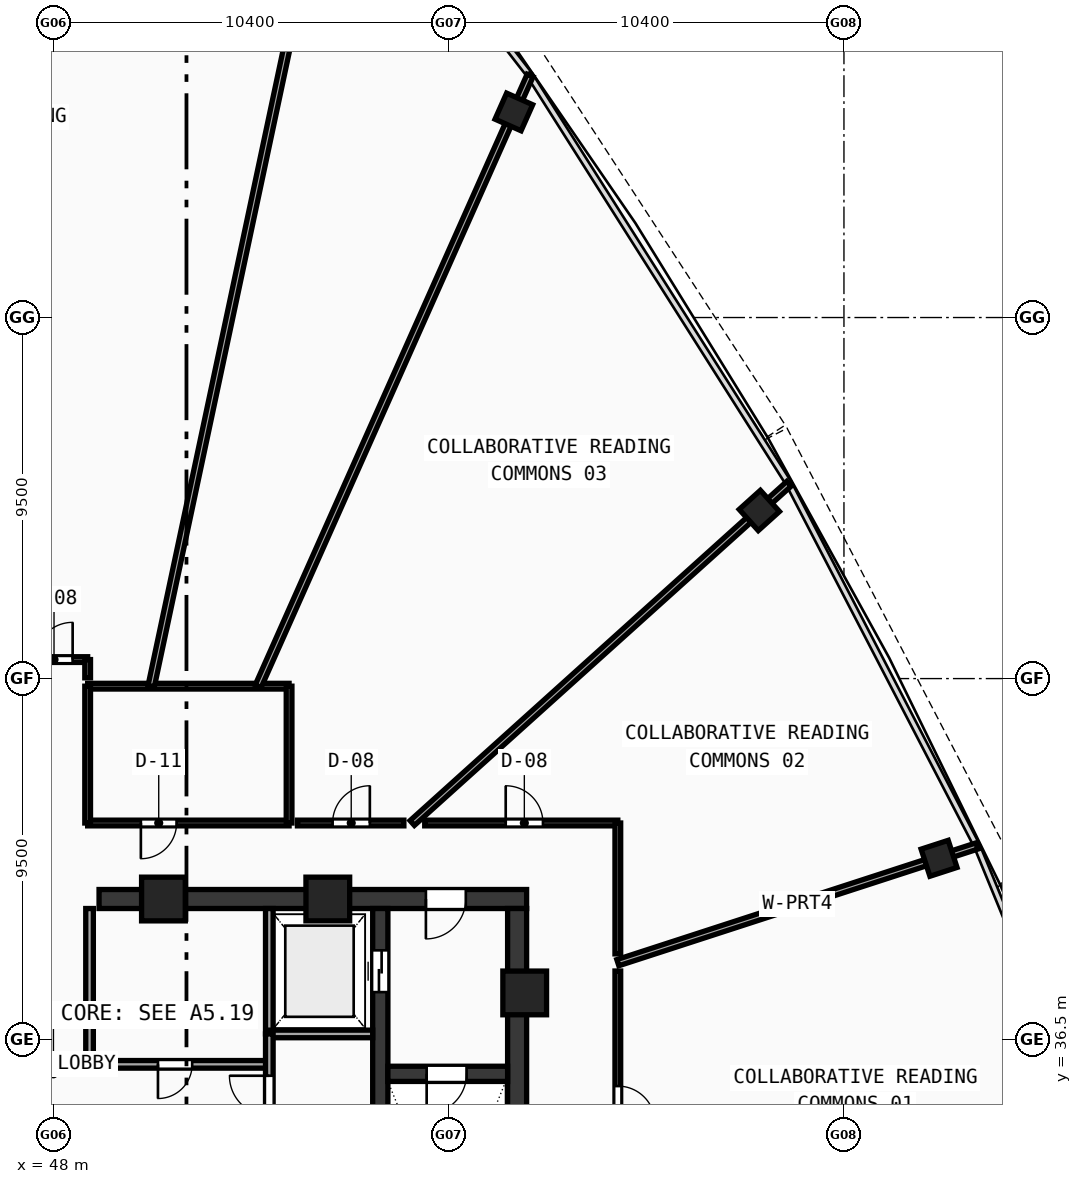
"""IFC4 building model, lengths in metres.
Left out: names, types, materials, properties, quantities, classifications, styles, units other than length and angle.
Written with IfcOpenShell. Run it as: python <this file> out.ifc"""

import sys

from ifc_helpers import new_model, si_unit, direction, frame, frame_2d, origin, origin_with_axes, origin_2d, place, context, subcontext, project, spatial, rectangle, hollow_rectangle, extrude, source, transform, mapped, element, fill, save


model = new_model("IFC4")
c1 = context("Model", 3, precision=1e-05, world=origin(), true_north=direction((0.0, 1.0)))
c2 = subcontext(c1, "Body", "Model", "MODEL_VIEW")
j1 = project(units=[si_unit("LENGTHUNIT", "METRE"), si_unit("PLANEANGLEUNIT", "RADIAN")], contexts=[c1])
p1 = place(None, origin())
s1 = spatial("IfcSite", under=j1, at=p1, CompositionType="ELEMENT")
p2 = place(p1, origin())
s2 = spatial("IfcBuilding", under=s1, at=p2, CompositionType="ELEMENT")
p3 = place(p2, frame((0.0, 0.0, 314.86)))
s3 = spatial("IfcBuildingStorey", under=s2, at=p3, CompositionType="ELEMENT", Elevation=314.86)
p4 = place(p3, frame((49.2, 40.2, 0.0), z_axis=(0.0, 0.0, 1.0), x_axis=(1.0, 0.0, 0.0)))
e1 = element("IfcWall", 1, at=p4, inside=s3, PredefinedType="SHEAR", context=c2, shape_type="SweptSolid", body=[
    extrude(rectangle(XDim=11.25, YDim=0.5, at=frame_2d((5.625, 0.0))), origin(), (0.0, 0.0, 1.0), 5.57),
])
p5 = place(p4, frame((8.6, 0.0, 0.0)))
e2 = element("IfcOpeningElement", 2, at=p5, cuts=e1, PredefinedType="OPENING", context=c2, shape_type="SweptSolid", body=[
    extrude(rectangle(XDim=1.05, YDim=2.1, at=frame_2d((0.525, 1.05))), frame((0.0, 0.26, 0.0), z_axis=(0.0, -1.0, 0.0), x_axis=(1.0, 0.0, 0.0)), (0.0, 0.0, 1.0), 0.52),
])
p6 = place(p3, frame((60.2, 27.75, 0.0), z_axis=(0.0, 0.0, 1.0), x_axis=(0.0, 1.0, 0.0)))
e3 = element("IfcWall", 3, at=p6, inside=s3, PredefinedType="SHEAR", context=c2, shape_type="SweptSolid", body=[
    extrude(rectangle(XDim=12.2, YDim=0.5, at=frame_2d((6.1, 0.0))), origin(), (0.0, 0.0, 1.0), 5.57),
])
p7 = place(p3, frame((56.6, 27.75, 0.0), z_axis=(0.0, 0.0, 1.0), x_axis=(0.0, 1.0, 0.0)))
e4 = element("IfcWall", 4, at=p7, inside=s3, PredefinedType="SHEAR", context=c2, shape_type="SweptSolid", body=[
    extrude(rectangle(XDim=12.2, YDim=0.4, at=frame_2d((6.1, 0.0))), origin(), (0.0, 0.0, 1.0), 5.57),
])
p8 = place(p7, frame((10.0, 0.0, 0.0)))
e5 = element("IfcOpeningElement", 5, at=p8, cuts=e4, PredefinedType="OPENING", context=c2, shape_type="SweptSolid", body=[
    extrude(rectangle(XDim=1.1, YDim=2.1, at=frame_2d((0.55, 1.05))), frame((0.0, 0.21, 0.0), z_axis=(0.0, -1.0, 0.0), x_axis=(1.0, 0.0, 0.0)), (0.0, 0.0, 1.0), 0.42),
])
p9 = place(p3, frame((56.8, 35.6, 0.0), z_axis=(0.0, 0.0, 1.0), x_axis=(1.0, 0.0, 0.0)))
e6 = element("IfcWall", 6, at=p9, inside=s3, PredefinedType="SHEAR", context=c2, shape_type="SweptSolid", body=[
    extrude(rectangle(XDim=3.15, YDim=0.4, at=frame_2d((1.575, 0.0))), origin(), (0.0, 0.0, 1.0), 5.57),
])
p10 = place(p9, frame((1.02, 0.0, 0.0)))
e7 = element("IfcOpeningElement", 7, at=p10, cuts=e6, PredefinedType="OPENING", context=c2, shape_type="SweptSolid", body=[
    extrude(rectangle(XDim=1.05, YDim=2.1, at=frame_2d((0.525, 1.05))), frame((0.0, 0.21, 0.0), z_axis=(0.0, -1.0, 0.0), x_axis=(1.0, 0.0, 0.0)), (0.0, 0.0, 1.0), 0.42),
])
m1 = source(origin(), c2, "Body", "SweptSolid", [
    extrude(hollow_rectangle(XDim=1.15, YDim=1.15, WallThickness=0.048, at=origin_2d()), origin(), (0.0, 0.0, 1.0), 5.83),
])
for number, where, z_axis, x_axis in (
    (8, (60.4, 37.729, -0.26), (0.0, 0.0, 1.0), (1.0, 0.0, 0.0)),
    (9, (55.219, 40.2, -0.26), (0.0, 0.0, 1.0), (1.0, 0.0, 0.0)),
    (10, (50.894, 40.2, -0.26), (0.0, 0.0, 1.0), (1.0, 0.0, 0.0)),
):
    element("IfcColumn", number, at=place(p3, frame(where, z_axis=z_axis, x_axis=x_axis)), inside=s3, PredefinedType="COLUMN", context=c2, shape_type="MappedRepresentation", body=[
        mapped(m1, transform((0.0, 0.0, 0.0), scale=1.0)),
    ])
m2 = source(origin(), c2, "Body", "SweptSolid", [
    extrude(hollow_rectangle(XDim=0.75, YDim=0.75, WallThickness=0.028, at=origin_2d()), origin(), (0.0, 0.0, 1.0), 5.83),
])
for number, where, z_axis, x_axis in (
    (11, (71.302, 41.271, -0.26), (0.0, 0.0, 1.0), (-0.309, 0.951, 0.0)),
    (12, (66.573, 50.424, -0.26), (0.0, 0.0, 1.0), (-0.669, 0.743, 0.0)),
    (13, (60.114, 60.909, -0.26), (0.0, 0.0, 1.0), (-0.914, 0.407, 0.0)),
):
    element("IfcColumn", number, at=place(p3, frame(where, z_axis=z_axis, x_axis=x_axis)), inside=s3, PredefinedType="COLUMN", context=c2, shape_type="MappedRepresentation", body=[
        mapped(m2, transform((0.0, 0.0, 0.0), scale=1.0)),
    ])
p11 = place(p3, frame((53.68, 36.65, 0.0), z_axis=(0.0, 0.0, 1.0), x_axis=(0.0, 1.0, 0.0)))
e14 = element("IfcWall", 14, at=p11, inside=s3, PredefinedType="SOLIDWALL", context=c2, shape_type="SweptSolid", body=[
    extrude(rectangle(XDim=3.3, YDim=0.2, at=frame_2d((1.65, 0.0))), origin(), (0.0, 0.0, 1.0), 5.57),
])
p12 = place(p3, frame((53.68, 36.65, 0.0), z_axis=(0.0, 0.0, 1.0), x_axis=(1.0, 0.0, 0.0)))
e15 = element("IfcWall", 15, at=p12, inside=s3, PredefinedType="SOLIDWALL", context=c2, shape_type="SweptSolid", body=[
    extrude(rectangle(XDim=2.72, YDim=0.2, at=frame_2d((1.36, 0.0))), origin(), (0.0, 0.0, 1.0), 5.57),
])
p13 = place(p3, frame((48.95, 35.85, 0.0), z_axis=(0.0, 0.0, 1.0), x_axis=(1.0, 0.0, 0.0)))
e16 = element("IfcWall", 16, at=p13, inside=s3, PredefinedType="SOLIDWALL", context=c2, shape_type="SweptSolid", body=[
    extrude(rectangle(XDim=4.73, YDim=0.2, at=frame_2d((2.365, 0.0))), origin(), (0.0, 0.0, 1.0), 5.57),
])
p14 = place(p13, frame((1.8, 0.0, 0.0)))
e17 = element("IfcOpeningElement", 17, at=p14, cuts=e16, PredefinedType="OPENING", context=c2, shape_type="SweptSolid", body=[
    extrude(rectangle(XDim=0.9, YDim=2.1, at=frame_2d((0.45, 1.05))), frame((0.0, 0.11, 0.0), z_axis=(0.0, -1.0, 0.0), x_axis=(1.0, 0.0, 0.0)), (0.0, 0.0, 1.0), 0.22),
])
p15 = place(p3, frame((48.95, 35.85, 0.0), z_axis=(0.0, 0.0, 1.0), x_axis=(0.0, 1.0, 0.0)))
e18 = element("IfcWall", 18, at=p15, inside=s3, PredefinedType="SOLIDWALL", context=c2, shape_type="SweptSolid", body=[
    extrude(rectangle(XDim=4.1, YDim=0.2, at=frame_2d((2.05, 0.0))), origin(), (0.0, 0.0, 1.0), 5.57),
])
p16 = place(p3, frame((53.68, 27.6, 0.0), z_axis=(0.0, 0.0, 1.0), x_axis=(0.0, 1.0, 0.0)))
e19 = element("IfcWall", 19, at=p16, inside=s3, PredefinedType="SOLIDWALL", context=c2, shape_type="SweptSolid", body=[
    extrude(rectangle(XDim=9.05, YDim=0.2, at=frame_2d((4.525, 0.0))), origin(), (0.0, 0.0, 1.0), 2.22),
])
p17 = place(p16, frame((6.9, 0.0, 0.0)))
e20 = element("IfcOpeningElement", 20, at=p17, cuts=e19, PredefinedType="OPENING", context=c2, shape_type="SweptSolid", body=[
    extrude(rectangle(XDim=1.05, YDim=2.1, at=frame_2d((0.525, 1.05))), frame((0.0, 0.11, 0.0), z_axis=(0.0, -1.0, 0.0), x_axis=(1.0, 0.0, 0.0)), (0.0, 0.0, 1.0), 0.22),
])
p18 = place(p3, frame((48.9, 42.2, 0.0), z_axis=(0.0, 0.0, 1.0), x_axis=(1.0, 0.0, 0.0)))
e21 = element("IfcWall", 21, at=p18, inside=s3, PredefinedType="PARTITIONING", context=c2, shape_type="SweptSolid", body=[
    extrude(rectangle(XDim=5.3, YDim=0.15, at=frame_2d((2.65, 0.0))), origin(), (0.0, 0.0, 1.0), 2.22),
])
p19 = place(p18, frame((1.4, 0.0, 0.0)))
e22 = element("IfcOpeningElement", 22, at=p19, cuts=e21, PredefinedType="OPENING", context=c2, shape_type="SweptSolid", body=[
    extrude(rectangle(XDim=0.94, YDim=2.1, at=frame_2d((0.47, 1.05))), frame((0.0, 0.085, 0.0), z_axis=(0.0, -1.0, 0.0), x_axis=(1.0, 0.0, 0.0)), (0.0, 0.0, 1.0), 0.17),
])
p20 = place(p3, frame((48.9, 45.8, 0.0), z_axis=(0.0, 0.0, 1.0), x_axis=(1.0, 0.0, 0.0)))
e23 = element("IfcWall", 23, at=p20, inside=s3, PredefinedType="PARTITIONING", context=c2, shape_type="SweptSolid", body=[
    extrude(rectangle(XDim=5.3, YDim=0.15, at=frame_2d((2.65, 0.0))), origin(), (0.0, 0.0, 1.0), 2.22),
])
p21 = place(p3, frame((48.9, 42.2, 0.0), z_axis=(0.0, 0.0, 1.0), x_axis=(0.0, 1.0, 0.0)))
e24 = element("IfcWall", 24, at=p21, inside=s3, PredefinedType="PARTITIONING", context=c2, shape_type="SweptSolid", body=[
    extrude(rectangle(XDim=3.6, YDim=0.15, at=frame_2d((1.8, 0.0))), origin(), (0.0, 0.0, 1.0), 5.57),
])
p22 = place(p3, frame((54.2, 42.2, 0.0), z_axis=(0.0, 0.0, 1.0), x_axis=(0.0, 1.0, 0.0)))
e25 = element("IfcWall", 25, at=p22, inside=s3, PredefinedType="PARTITIONING", context=c2, shape_type="SweptSolid", body=[
    extrude(rectangle(XDim=3.6, YDim=0.15, at=frame_2d((1.8, 0.0))), origin(), (0.0, 0.0, 1.0), 5.22),
])
p23 = place(p3, frame((62.85, 38.525, 0.0), z_axis=(0.0, 0.0, 1.0), x_axis=(0.951056273407, 0.309017741906, 0.0)))
e26 = element("IfcWall", 26, at=p23, inside=s3, PredefinedType="PARTITIONING", context=c2, shape_type="SweptSolid", body=[
    extrude(rectangle(XDim=9.937, YDim=0.17, at=frame_2d((4.969, 0.0))), origin(), (0.0, 0.0, 1.0), 2.22),
])
p24 = place(p3, frame((57.44, 42.2, 0.0), z_axis=(0.0, 0.0, 1.0), x_axis=(0.743143971996, 0.669131554245, 0.0)))
e27 = element("IfcWall", 27, at=p24, inside=s3, PredefinedType="PARTITIONING", context=c2, shape_type="SweptSolid", body=[
    extrude(rectangle(XDim=13.34, YDim=0.17, at=frame_2d((6.67, 0.0))), origin(), (0.0, 0.0, 1.0), 2.22),
])
p25 = place(p3, frame((53.387, 45.8, 0.0), z_axis=(0.0, 0.0, 1.0), x_axis=(0.406746244391, 0.913541182801, 0.0)))
e28 = element("IfcWall", 28, at=p25, inside=s3, PredefinedType="PARTITIONING", context=c2, shape_type="SweptSolid", body=[
    extrude(rectangle(XDim=17.589, YDim=0.17, at=frame_2d((8.794, 0.0))), origin(), (0.0, 0.0, 1.0), 2.22),
])
p26 = place(p3, frame((50.572, 45.8, 0.0), z_axis=(0.0, 0.0, 1.0), x_axis=(0.207911865665, 0.978147563569, 0.0)))
e29 = element("IfcWall", 29, at=p26, inside=s3, PredefinedType="PARTITIONING", context=c2, shape_type="SweptSolid", body=[
    extrude(rectangle(XDim=23.201, YDim=0.17, at=frame_2d((11.601, 0.0))), origin(), (0.0, 0.0, 1.0), 4.97),
])
p27 = place(p3, frame((47.1, 46.5, 0.0), z_axis=(0.0, 0.0, 1.0), x_axis=(1.0, 0.0, 0.0)))
e30 = element("IfcWall", 30, at=p27, inside=s3, PredefinedType="PARTITIONING", context=c2, shape_type="SweptSolid", body=[
    extrude(rectangle(XDim=1.8, YDim=0.15, at=frame_2d((0.9, 0.0))), origin(), (0.0, 0.0, 1.0), 5.22),
])
p28 = place(p27, frame((0.425, 0.0, 0.0)))
e31 = element("IfcOpeningElement", 31, at=p28, cuts=e30, PredefinedType="OPENING", context=c2, shape_type="SweptSolid", body=[
    extrude(rectangle(XDim=0.98, YDim=2.12, at=frame_2d((0.49, 1.06))), frame((0.0, 0.085, 0.0), z_axis=(0.0, -1.0, 0.0), x_axis=(1.0, 0.0, 0.0)), (0.0, 0.0, 1.0), 0.17),
])
p29 = place(p3, frame((48.9, 46.5, 0.0), z_axis=(0.0, 0.0, 1.0), x_axis=(0.0, -1.0, 0.0)))
e32 = element("IfcWall", 32, at=p29, inside=s3, PredefinedType="PARTITIONING", context=c2, shape_type="SweptSolid", body=[
    extrude(rectangle(XDim=0.48, YDim=0.15, at=frame_2d((0.24, 0.0))), origin(), (0.0, 0.0, 1.0), 5.22),
])
p30 = place(p3, frame((54.42, 42.2, 0.0), z_axis=(0.0, 0.0, 1.0), x_axis=(1.0, 0.0, 0.0)))
e33 = element("IfcWall", 33, at=p30, inside=s3, PredefinedType="PARTITIONING", context=c2, shape_type="SweptSolid", body=[
    extrude(rectangle(XDim=2.801, YDim=0.15, at=frame_2d((1.4, 0.0))), origin(), (0.0, 0.0, 1.0), 2.22),
])
p31 = place(p30, frame((0.925, 0.0, 0.0)))
e34 = element("IfcOpeningElement", 34, at=p31, cuts=e33, PredefinedType="OPENING", context=c2, shape_type="SweptSolid", body=[
    extrude(rectangle(XDim=0.98, YDim=2.12, at=frame_2d((0.49, 1.06))), frame((0.0, 0.085, 0.0), z_axis=(0.0, -1.0, 0.0), x_axis=(1.0, 0.0, 0.0)), (0.0, 0.0, 1.0), 0.17),
])
p32 = place(p3, frame((57.769, 42.2, 0.0), z_axis=(0.0, 0.0, 1.0), x_axis=(1.0, 0.0, 0.0)))
e35 = element("IfcWall", 35, at=p32, inside=s3, PredefinedType="PARTITIONING", context=c2, shape_type="SweptSolid", body=[
    extrude(rectangle(XDim=5.081, YDim=0.15, at=frame_2d((2.541, 0.0))), origin(), (0.0, 0.0, 1.0), 2.22),
])
p33 = place(p32, frame((2.131, 0.0, 0.0)))
e36 = element("IfcOpeningElement", 36, at=p33, cuts=e35, PredefinedType="OPENING", context=c2, shape_type="SweptSolid", body=[
    extrude(rectangle(XDim=0.98, YDim=2.12, at=frame_2d((0.49, 1.06))), frame((0.0, 0.085, 0.0), z_axis=(0.0, -1.0, 0.0), x_axis=(1.0, 0.0, 0.0)), (0.0, 0.0, 1.0), 0.17),
])
p34 = place(p3, frame((62.85, 42.2, 0.0), z_axis=(0.0, 0.0, 1.0), x_axis=(0.0, -1.0, 0.0)))
e37 = element("IfcWall", 37, at=p34, inside=s3, PredefinedType="PARTITIONING", context=c2, shape_type="SweptSolid", body=[
    extrude(rectangle(XDim=3.444, YDim=0.15, at=frame_2d((1.722, 0.0))), origin(), (0.0, 0.0, 1.0), 2.22),
])
p35 = place(p3, frame((62.85, 38.305, 0.0), z_axis=(0.0, 0.0, 1.0), x_axis=(0.0, -1.0, 0.0)))
e38 = element("IfcWall", 38, at=p35, inside=s3, PredefinedType="PARTITIONING", context=c2, shape_type="SweptSolid", body=[
    extrude(rectangle(XDim=7.004, YDim=0.15, at=frame_2d((3.502, 0.0))), origin(), (0.0, 0.0, 1.0), 2.22),
])
p36 = place(p35, frame((3.027, 0.0, 0.0)))
e39 = element("IfcOpeningElement", 39, at=p36, cuts=e38, PredefinedType="OPENING", context=c2, shape_type="SweptSolid", body=[
    extrude(rectangle(XDim=0.98, YDim=2.12, at=frame_2d((0.49, 1.06))), frame((0.0, 0.085, 0.0), z_axis=(0.0, -1.0, 0.0), x_axis=(1.0, 0.0, 0.0)), (0.0, 0.0, 1.0), 0.17),
])
m3 = source(origin(), c2, "Body", "SweptSolid", [
    extrude(rectangle(XDim=1.05, YDim=2.1, at=frame_2d((0.525, 1.05))), frame((0.0, 0.025, 0.0), z_axis=(0.0, -1.0, 0.0), x_axis=(1.0, 0.0, 0.0)), (0.0, 0.0, 1.0), 0.05),
])
p37 = place(p10, frame((1.05, 0.0, 0.0), z_axis=(0.0, 0.0, 1.0), x_axis=(-1.0, 0.0, 0.0)))
e40 = element("IfcDoor", 40, at=p37, inside=s3, OperationType="SINGLE_SWING_RIGHT", PredefinedType="DOOR", context=c2, shape_type="MappedRepresentation", body=[
    mapped(m3, transform((0.0, 0.0, 0.0), scale=1.0)),
])
fill(e7, e40)
p38 = place(p5, frame((1.05, 0.0, 0.0), z_axis=(0.0, 0.0, 1.0), x_axis=(-1.0, 0.0, 0.0)))
e41 = element("IfcDoor", 41, at=p38, inside=s3, OperationType="SINGLE_SWING_RIGHT", PredefinedType="DOOR", context=c2, shape_type="MappedRepresentation", body=[
    mapped(m3, transform((0.0, 0.0, 0.0), scale=1.0)),
])
fill(e2, e41)
m4 = source(origin(), c2, "Body", "SweptSolid", [
    extrude(rectangle(XDim=1.1, YDim=2.1, at=frame_2d((0.55, 1.05))), frame((0.0, 0.025, 0.0), z_axis=(0.0, -1.0, 0.0), x_axis=(1.0, 0.0, 0.0)), (0.0, 0.0, 1.0), 0.05),
])
p39 = place(p8, origin_with_axes())
e42 = element("IfcDoor", 42, at=p39, inside=s3, OperationType="DOUBLE_DOOR_SLIDING", PredefinedType="DOOR", context=c2, shape_type="MappedRepresentation", body=[
    mapped(m4, transform((0.0, 0.0, 0.0), scale=1.0)),
])
fill(e5, e42)
m5 = source(origin(), c2, "Body", "SweptSolid", [
    extrude(rectangle(XDim=0.9, YDim=2.1, at=frame_2d((0.45, 1.05))), frame((0.0, 0.025, 0.0), z_axis=(0.0, -1.0, 0.0), x_axis=(1.0, 0.0, 0.0)), (0.0, 0.0, 1.0), 0.05),
])
p40 = place(p14, frame((0.9, 0.0, 0.0), z_axis=(0.0, 0.0, 1.0), x_axis=(-1.0, 0.0, 0.0)))
e43 = element("IfcDoor", 43, at=p40, inside=s3, OperationType="SINGLE_SWING_RIGHT", PredefinedType="DOOR", context=c2, shape_type="MappedRepresentation", body=[
    mapped(m5, transform((0.0, 0.0, 0.0), scale=1.0)),
])
fill(e17, e43)
p41 = place(p17, origin_with_axes())
e44 = element("IfcDoor", 44, at=p41, inside=s3, OperationType="SINGLE_SWING_RIGHT", PredefinedType="DOOR", context=c2, shape_type="MappedRepresentation", body=[
    mapped(m3, transform((0.0, 0.0, 0.0), scale=1.0)),
])
fill(e20, e44)
m6 = source(origin(), c2, "Body", "SweptSolid", [
    extrude(rectangle(XDim=0.94, YDim=2.1, at=frame_2d((0.47, 1.05))), frame((0.0, 0.025, 0.0), z_axis=(0.0, -1.0, 0.0), x_axis=(1.0, 0.0, 0.0)), (0.0, 0.0, 1.0), 0.05),
])
p42 = place(p19, frame((0.94, 0.0, 0.0), z_axis=(0.0, 0.0, 1.0), x_axis=(-1.0, 0.0, 0.0)))
e45 = element("IfcDoor", 45, at=p42, inside=s3, OperationType="SINGLE_SWING_RIGHT", PredefinedType="DOOR", context=c2, shape_type="MappedRepresentation", body=[
    mapped(m6, transform((0.0, 0.0, 0.0), scale=1.0)),
])
fill(e22, e45)
m7 = source(origin(), c2, "Body", "SweptSolid", [
    extrude(rectangle(XDim=0.98, YDim=2.12, at=frame_2d((0.49, 1.06))), frame((0.0, 0.025, 0.0), z_axis=(0.0, -1.0, 0.0), x_axis=(1.0, 0.0, 0.0)), (0.0, 0.0, 1.0), 0.05),
])
p43 = place(p36, origin_with_axes())
e46 = element("IfcDoor", 46, at=p43, inside=s3, OperationType="SINGLE_SWING_RIGHT", PredefinedType="DOOR", context=c2, shape_type="MappedRepresentation", body=[
    mapped(m7, transform((0.0, 0.0, 0.0), scale=1.0)),
])
fill(e39, e46)
p44 = place(p33, origin_with_axes())
e47 = element("IfcDoor", 47, at=p44, inside=s3, OperationType="SINGLE_SWING_LEFT", PredefinedType="DOOR", context=c2, shape_type="MappedRepresentation", body=[
    mapped(m7, transform((0.0, 0.0, 0.0), scale=1.0)),
])
fill(e36, e47)
p45 = place(p31, origin_with_axes())
e48 = element("IfcDoor", 48, at=p45, inside=s3, OperationType="SINGLE_SWING_RIGHT", PredefinedType="DOOR", context=c2, shape_type="MappedRepresentation", body=[
    mapped(m7, transform((0.0, 0.0, 0.0), scale=1.0)),
])
fill(e34, e48)
p46 = place(p28, origin_with_axes())
e49 = element("IfcDoor", 49, at=p46, inside=s3, OperationType="SINGLE_SWING_RIGHT", PredefinedType="DOOR", context=c2, shape_type="MappedRepresentation", body=[
    mapped(m7, transform((0.0, 0.0, 0.0), scale=1.0)),
])
fill(e31, e49)
save(model, sys.argv[1])
